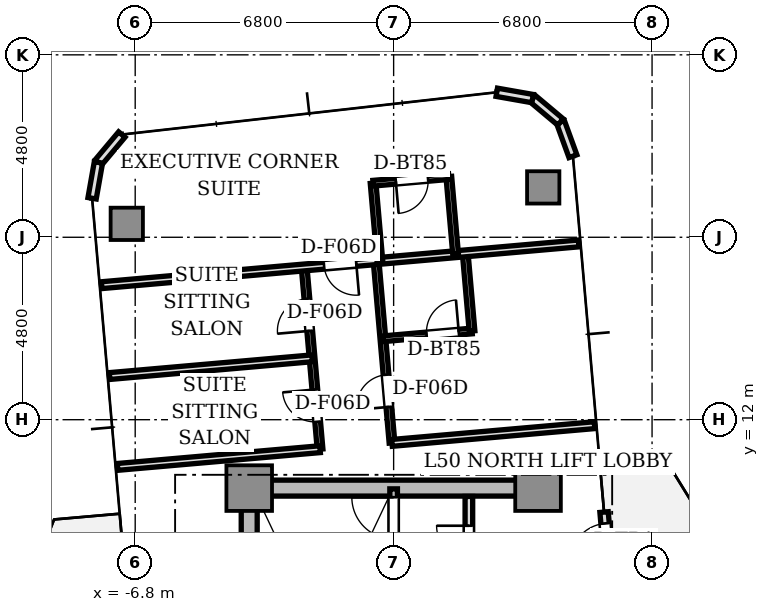
"""IFC4 building model, lengths in metres.
Left out: names, types, materials, properties, quantities, classifications, styles, units other than length and angle.
Written with IfcOpenShell. Run it as: python <this file> out.ifc"""

import sys

from ifc_helpers import new_model, si_unit, direction, frame, frame_2d, origin, origin_2d, place, context, subcontext, project, spatial, rectangle, extrude, source, transform, mapped, element, fill, save


model = new_model("IFC4")
c1 = context("Model", 3, precision=1e-05, world=origin(), true_north=direction((0.0, 1.0)))
c2 = subcontext(c1, "Body", "Model", "MODEL_VIEW")
j1 = project(units=[si_unit("LENGTHUNIT", "METRE"), si_unit("PLANEANGLEUNIT", "RADIAN")], contexts=[c1])
p1 = place(None, origin())
s1 = spatial("IfcSite", under=j1, at=p1, CompositionType="ELEMENT")
p2 = place(p1, origin())
s2 = spatial("IfcBuilding", under=s1, at=p2, CompositionType="ELEMENT")
p3 = place(p2, frame((0.0, 0.0, 181.9)))
s3 = spatial("IfcBuildingStorey", under=s2, at=p3, CompositionType="ELEMENT", Elevation=181.9)
p4 = place(p3, frame((-3.55, 10.2, 0.0), z_axis=(0.0, 0.0, 1.0), x_axis=(1.0, 0.0, 0.0)))
e1 = element("IfcWall", 1, at=p4, inside=s3, PredefinedType="SHEAR", context=c2, shape_type="SweptSolid", body=[
    extrude(rectangle(XDim=7.1, YDim=0.42, at=frame_2d((3.55, 0.0))), origin(), (0.0, 0.0, 1.0), 3.11),
])
p5 = place(p3, frame((-3.8, 2.85, 0.0), z_axis=(0.0, 0.0, 1.0), x_axis=(0.0, 1.0, 0.0)))
e2 = element("IfcWall", 2, at=p5, inside=s3, PredefinedType="SHEAR", context=c2, shape_type="SweptSolid", body=[
    extrude(rectangle(XDim=6.9, YDim=0.42, at=frame_2d((3.45, 0.0))), origin(), (0.0, 0.0, 1.0), 3.11),
])
m1 = source(origin(), c2, "Body", "SweptSolid", [
    extrude(rectangle(XDim=1.2, YDim=1.2, at=origin_2d()), origin(), (0.0, 0.0, 1.0), 3.11),
])
for number, where, z_axis, x_axis in (
    (3, (-3.8, 10.2, 0.0), (0.0, 0.0, 1.0), (1.0, 0.0, 0.0)),
    (4, (3.8, 10.2, 0.0), (0.0, 0.0, 1.0), (1.0, 0.0, 0.0)),
):
    element("IfcColumn", number, at=place(p3, frame(where, z_axis=z_axis, x_axis=x_axis)), inside=s3, PredefinedType="COLUMN", context=c2, shape_type="MappedRepresentation", body=[
        mapped(m1, transform((0.0, 0.0, 0.0), scale=1.0)),
    ])
m2 = source(origin(), c2, "Body", "SweptSolid", [
    extrude(rectangle(XDim=0.85, YDim=0.85, at=origin_2d()), origin(), (0.0, 0.0, 1.0), 3.11),
])
for number, where, z_axis, x_axis in (
    (5, (3.936, 18.112, 0.0), (0.0, 0.0, 1.0), (1.0, 0.0, 0.0)),
    (6, (-7.022, 17.153, 0.0), (0.0, 0.0, 1.0), (1.0, 0.0, 0.0)),
):
    element("IfcColumn", number, at=place(p3, frame(where, z_axis=z_axis, x_axis=x_axis)), inside=s3, PredefinedType="COLUMN", context=c2, shape_type="MappedRepresentation", body=[
        mapped(m2, transform((0.0, 0.0, 0.0), scale=1.0)),
    ])
p6 = place(p3, frame((5.772, 6.879, 0.0), z_axis=(0.0, 0.0, 1.0), x_axis=(-0.087168071984, 0.996193619346, 0.0)))
e7 = element("IfcWall", 7, at=p6, inside=s3, PredefinedType="STANDARD", context=c2, shape_type="SweptSolid", body=[
    extrude(rectangle(XDim=2.7, YDim=0.22, at=frame_2d((1.35, 0.0))), origin(), (0.0, 0.0, 1.0), 3.11),
])
p7 = place(p6, frame((1.4, 0.0, 0.0)))
e8 = element("IfcOpeningElement", 8, at=p7, cuts=e7, PredefinedType="OPENING", context=c2, shape_type="SweptSolid", body=[
    extrude(rectangle(XDim=1.0, YDim=2.2, at=frame_2d((0.5, 1.1))), frame((0.0, 0.12, 0.0), z_axis=(0.0, -1.0, 0.0), x_axis=(1.0, 0.0, 0.0)), (0.0, 0.0, 1.0), 0.24),
])
p8 = place(p3, frame((4.718, 18.933, 0.0), z_axis=(0.0, 0.0, 1.0), x_axis=(-0.34188635151, 0.939741306239, 0.0)))
e9 = element("IfcWall", 9, at=p8, inside=s3, PredefinedType="STANDARD", context=c2, shape_type="SweptSolid", body=[
    extrude(rectangle(XDim=0.958, YDim=0.22, at=frame_2d((0.479, 0.0))), origin(), (0.0, 0.0, 1.0), 3.11),
])
for number, where, z_axis, x_axis in (
    (10, (4.39, 19.833, 0.0), (0.0, 0.0, 1.0), (-0.766, 0.643, 0.0)),
    (11, (3.657, 20.449, 0.0), (0.0, 0.0, 1.0), (-0.985, 0.174, 0.0)),
):
    element("IfcWall", number, at=place(p3, frame(where, z_axis=z_axis, x_axis=x_axis)), inside=s3, PredefinedType="STANDARD", context=c2, shape_type="SweptSolid", body=[
        extrude(rectangle(XDim=0.958, YDim=0.22, at=frame_2d((0.479, 0.0))), origin(), (0.0, 0.0, 1.0), 3.11),
    ])
for number, where, z_axis, x_axis in (
    (12, (-7.152, 19.503, 0.0), (0.0, 0.0, 1.0), (-0.643, -0.766, 0.0)),
    (13, (-7.768, 18.769, 0.0), (0.0, 0.0, 1.0), (-0.174, -0.985, 0.0)),
):
    element("IfcWall", number, at=place(p3, frame(where, z_axis=z_axis, x_axis=x_axis)), inside=s3, PredefinedType="STANDARD", context=c2, shape_type="SweptSolid", body=[
        extrude(rectangle(XDim=0.958, YDim=0.22, at=frame_2d((0.479, 0.0))), origin(), (0.0, 0.0, 1.0), 3.11),
    ])
p9 = place(p3, frame((0.0, 2.5, 0.0), z_axis=(0.0, 0.0, 1.0), x_axis=(0.0, 1.0, 0.0)))
e14 = element("IfcWall", 14, at=p9, inside=s3, PredefinedType="SOLIDWALL", context=c2, shape_type="SweptSolid", body=[
    extrude(rectangle(XDim=7.68, YDim=0.2, at=frame_2d((3.84, 0.0))), origin(), (0.0, 0.0, 1.0), 3.11),
])
p10 = place(p9, frame((6.36, 0.0, 0.0)))
e15 = element("IfcOpeningElement", 15, at=p10, cuts=e14, PredefinedType="OPENING", context=c2, shape_type="SweptSolid", body=[
    extrude(rectangle(XDim=1.1, YDim=2.15, at=frame_2d((0.55, 1.075))), frame((0.0, 0.11, 0.0), z_axis=(0.0, -1.0, 0.0), x_axis=(1.0, 0.0, 0.0)), (0.0, 0.0, 1.0), 0.22),
])
p11 = place(p3, frame((1.98, 5.32, 0.0), z_axis=(0.0, 0.0, 1.0), x_axis=(0.0, 1.0, 0.0)))
e16 = element("IfcWall", 16, at=p11, inside=s3, PredefinedType="SOLIDWALL", context=c2, shape_type="SweptSolid", body=[
    extrude(rectangle(XDim=4.66, YDim=0.2, at=frame_2d((2.33, 0.0))), origin(), (0.0, 0.0, 1.0), 2.66),
])
p12 = place(p11, frame((3.04, 0.0, 0.0)))
e17 = element("IfcOpeningElement", 17, at=p12, cuts=e16, PredefinedType="OPENING", context=c2, shape_type="SweptSolid", body=[
    extrude(rectangle(XDim=0.85, YDim=2.1, at=frame_2d((0.425, 1.05))), frame((0.0, 0.11, 0.0), z_axis=(0.0, -1.0, 0.0), x_axis=(1.0, 0.0, 0.0)), (0.0, 0.0, 1.0), 0.22),
])
p13 = place(p3, frame((-1.936, 11.224, 0.0), z_axis=(0.0, 0.0, 1.0), x_axis=(-0.087182724829, 0.996192337097, 0.0)))
e18 = element("IfcWall", 18, at=p13, inside=s3, PredefinedType="PARTITIONING", context=c2, shape_type="SweptSolid", body=[
    extrude(rectangle(XDim=4.8, YDim=0.15, at=frame_2d((2.4, 0.0))), origin(), (0.0, 0.0, 1.0), 2.66),
])
p14 = place(p13, frame((0.725, 0.0, 0.0)))
e19 = element("IfcOpeningElement", 19, at=p14, cuts=e18, PredefinedType="OPENING", context=c2, shape_type="SweptSolid", body=[
    extrude(rectangle(XDim=0.85, YDim=2.1, at=frame_2d((0.425, 1.05))), frame((0.0, 0.085, 0.0), z_axis=(0.0, -1.0, 0.0), x_axis=(1.0, 0.0, 0.0)), (0.0, 0.0, 1.0), 0.17),
])
p15 = place(p13, frame((3.125, 0.0, 0.0)))
e20 = element("IfcOpeningElement", 20, at=p15, cuts=e18, PredefinedType="OPENING", context=c2, shape_type="SweptSolid", body=[
    extrude(rectangle(XDim=0.85, YDim=2.1, at=frame_2d((0.425, 1.05))), frame((0.0, 0.085, 0.0), z_axis=(0.0, -1.0, 0.0), x_axis=(1.0, 0.0, 0.0)), (0.0, 0.0, 1.0), 0.17),
])
p16 = place(p3, frame((-0.043, 11.39, 0.0), z_axis=(0.0, 0.0, 1.0), x_axis=(-0.087178307383, 0.996192723684, 0.0)))
e21 = element("IfcWall", 21, at=p16, inside=s3, PredefinedType="PARTITIONING", context=c2, shape_type="SweptSolid", body=[
    extrude(rectangle(XDim=4.8, YDim=0.15, at=frame_2d((2.4, 0.0))), origin(), (0.0, 0.0, 1.0), 2.66),
])
p17 = place(p16, frame((0.95, 0.0, 0.0)))
e22 = element("IfcOpeningElement", 22, at=p17, cuts=e21, PredefinedType="OPENING", context=c2, shape_type="SweptSolid", body=[
    extrude(rectangle(XDim=0.85, YDim=2.1, at=frame_2d((0.425, 1.05))), frame((0.0, 0.085, 0.0), z_axis=(0.0, -1.0, 0.0), x_axis=(1.0, 0.0, 0.0)), (0.0, 0.0, 1.0), 0.17),
])
for number, where, z_axis, x_axis in (
    (23, (-1.936, 11.224, 0.0), (0.0, 0.0, 1.0), (-0.996, -0.087, 0.0)),
    (24, (5.287, 11.856, 0.0), (0.0, 0.0, 1.0), (-0.996, -0.087, 0.0)),
    (25, (-2.145, 13.615, 0.0), (0.0, 0.0, 1.0), (-0.996, -0.087, 0.0)),
):
    element("IfcWall", number, at=place(p3, frame(where, z_axis=z_axis, x_axis=x_axis)), inside=s3, PredefinedType="PARTITIONING", context=c2, shape_type="SweptSolid", body=[
        extrude(rectangle(XDim=5.35, YDim=0.18, at=frame_2d((2.675, 0.0))), origin(), (0.0, 0.0, 1.0), 2.66),
    ])
p18 = place(p3, frame((-0.282, 14.129, 0.0), z_axis=(0.0, 0.0, 1.0), x_axis=(0.996197656711, 0.087121918963, 0.0)))
e26 = element("IfcWall", 26, at=p18, inside=s3, PredefinedType="PARTITIONING", context=c2, shape_type="SweptSolid", body=[
    extrude(rectangle(XDim=2.354, YDim=0.15, at=frame_2d((1.177, 0.0))), origin(), (0.0, 0.0, 1.0), 2.66),
])
p19 = place(p18, frame((1.154, 0.0, 0.0)))
e27 = element("IfcOpeningElement", 27, at=p19, cuts=e26, PredefinedType="OPENING", context=c2, shape_type="SweptSolid", body=[
    extrude(rectangle(XDim=0.85, YDim=2.1, at=frame_2d((0.425, 1.05))), frame((0.0, 0.085, 0.0), z_axis=(0.0, -1.0, 0.0), x_axis=(1.0, 0.0, 0.0)), (0.0, 0.0, 1.0), 0.17),
])
p20 = place(p3, frame((2.062, 14.334, 0.0), z_axis=(0.0, 0.0, 1.0), x_axis=(-0.087174336889, 0.99619307114, 0.0)))
e28 = element("IfcWall", 28, at=p20, inside=s3, PredefinedType="PARTITIONING", context=c2, shape_type="SweptSolid", body=[
    extrude(rectangle(XDim=2.05, YDim=0.15, at=frame_2d((1.025, 0.0))), origin(), (0.0, 0.0, 1.0), 2.66),
])
p21 = place(p3, frame((4.868, 16.638, 0.0), z_axis=(0.0, 0.0, 1.0), x_axis=(-0.996194790044, -0.087154691724, 0.0)))
e29 = element("IfcWall", 29, at=p21, inside=s3, PredefinedType="PARTITIONING", context=c2, shape_type="SweptSolid", body=[
    extrude(rectangle(XDim=12.6, YDim=0.18, at=frame_2d((6.3, 0.0))), origin(), (0.0, 0.0, 1.0), 2.66),
])
p22 = place(p21, frame((5.875, 0.0, 0.0)))
e30 = element("IfcOpeningElement", 30, at=p22, cuts=e29, PredefinedType="OPENING", context=c2, shape_type="SweptSolid", body=[
    extrude(rectangle(XDim=0.85, YDim=2.1, at=frame_2d((0.425, 1.05))), frame((0.0, 0.1, 0.0), z_axis=(0.0, -1.0, 0.0), x_axis=(1.0, 0.0, 0.0)), (0.0, 0.0, 1.0), 0.2),
])
p23 = place(p3, frame((-0.362, 16.18, 0.0), z_axis=(0.0, 0.0, 1.0), x_axis=(-0.087174336889, 0.99619307114, 0.0)))
e31 = element("IfcWall", 31, at=p23, inside=s3, PredefinedType="PARTITIONING", context=c2, shape_type="SweptSolid", body=[
    extrude(rectangle(XDim=2.05, YDim=0.15, at=frame_2d((1.025, 0.0))), origin(), (0.0, 0.0, 1.0), 2.66),
])
p24 = place(p3, frame((1.631, 16.354, 0.0), z_axis=(0.0, 0.0, 1.0), x_axis=(-0.087184680235, 0.996192165966, 0.0)))
e32 = element("IfcWall", 32, at=p24, inside=s3, PredefinedType="PARTITIONING", context=c2, shape_type="SweptSolid", body=[
    extrude(rectangle(XDim=2.05, YDim=0.15, at=frame_2d((1.025, 0.0))), origin(), (0.0, 0.0, 1.0), 2.66),
])
p25 = place(p3, frame((1.452, 18.396, 0.0), z_axis=(0.0, 0.0, 1.0), x_axis=(-0.996205236158, -0.087035208109, 0.0)))
e33 = element("IfcWall", 33, at=p25, inside=s3, PredefinedType="PARTITIONING", context=c2, shape_type="SweptSolid", body=[
    extrude(rectangle(XDim=2.0, YDim=0.15, at=frame_2d((1.0, 0.0))), origin(), (0.0, 0.0, 1.0), 2.66),
])
p26 = place(p25, frame((0.55, 0.0, 0.0)))
e34 = element("IfcOpeningElement", 34, at=p26, cuts=e33, PredefinedType="OPENING", context=c2, shape_type="SweptSolid", body=[
    extrude(rectangle(XDim=0.85, YDim=2.1, at=frame_2d((0.425, 1.05))), frame((0.0, 0.085, 0.0), z_axis=(0.0, -1.0, 0.0), x_axis=(1.0, 0.0, 0.0)), (0.0, 0.0, 1.0), 0.17),
])
m3 = source(origin(), c2, "Body", "SweptSolid", [
    extrude(rectangle(XDim=1.0, YDim=0.05, at=origin_2d()), origin(), (0.0, 0.0, 1.0), 2.2),
])
p27 = place(p7, frame((0.5, 0.0, 0.0)))
e35 = element("IfcDoor", 35, at=p27, inside=s3, OperationType="SINGLE_SWING_LEFT", PredefinedType="DOOR", context=c2, shape_type="MappedRepresentation", body=[
    mapped(m3, transform((0.0, 0.0, 0.0), scale=1.0)),
])
fill(e8, e35)
m4 = source(origin(), c2, "Body", "SweptSolid", [
    extrude(rectangle(XDim=1.1, YDim=0.05, at=origin_2d()), origin(), (0.0, 0.0, 1.0), 2.15),
])
p28 = place(p10, frame((0.55, 0.0, 0.0)))
e36 = element("IfcDoor", 36, at=p28, inside=s3, OperationType="SINGLE_SWING_RIGHT", PredefinedType="DOOR", context=c2, shape_type="MappedRepresentation", body=[
    mapped(m4, transform((0.0, 0.0, 0.0), scale=1.0)),
])
fill(e15, e36)
m5 = source(origin(), c2, "Body", "SweptSolid", [
    extrude(rectangle(XDim=0.85, YDim=0.05, at=origin_2d()), origin(), (0.0, 0.0, 1.0), 2.1),
])
p29 = place(p12, frame((0.425, 0.0, 0.0)))
e37 = element("IfcDoor", 37, at=p29, inside=s3, OperationType="SINGLE_SWING_RIGHT", PredefinedType="DOOR", context=c2, shape_type="MappedRepresentation", body=[
    mapped(m5, transform((0.0, 0.0, 0.0), scale=1.0)),
])
fill(e17, e37)
p30 = place(p14, frame((0.425, 0.0, 0.0)))
e38 = element("IfcDoor", 38, at=p30, inside=s3, OperationType="SINGLE_SWING_RIGHT", PredefinedType="DOOR", context=c2, shape_type="MappedRepresentation", body=[
    mapped(m5, transform((0.0, 0.0, 0.0), scale=1.0)),
])
fill(e19, e38)
p31 = place(p15, frame((0.425, 0.0, 0.0)))
e39 = element("IfcDoor", 39, at=p31, inside=s3, OperationType="SINGLE_SWING_LEFT", PredefinedType="DOOR", context=c2, shape_type="MappedRepresentation", body=[
    mapped(m5, transform((0.0, 0.0, 0.0), scale=1.0)),
])
fill(e20, e39)
p32 = place(p19, frame((0.425, 0.0, 0.0)))
e40 = element("IfcDoor", 40, at=p32, inside=s3, OperationType="SINGLE_SWING_RIGHT", PredefinedType="DOOR", context=c2, shape_type="MappedRepresentation", body=[
    mapped(m5, transform((0.0, 0.0, 0.0), scale=1.0)),
])
fill(e27, e40)
p33 = place(p17, frame((0.425, 0.0, 0.0)))
e41 = element("IfcDoor", 41, at=p33, inside=s3, OperationType="SINGLE_SWING_LEFT", PredefinedType="DOOR", context=c2, shape_type="MappedRepresentation", body=[
    mapped(m5, transform((0.0, 0.0, 0.0), scale=1.0)),
])
fill(e22, e41)
p34 = place(p26, frame((0.425, 0.0, 0.0)))
e42 = element("IfcDoor", 42, at=p34, inside=s3, OperationType="SINGLE_SWING_RIGHT", PredefinedType="DOOR", context=c2, shape_type="MappedRepresentation", body=[
    mapped(m5, transform((0.0, 0.0, 0.0), scale=1.0)),
])
fill(e34, e42)
p35 = place(p22, frame((0.425, 0.0, 0.0)))
e43 = element("IfcDoor", 43, at=p35, inside=s3, OperationType="SINGLE_SWING_LEFT", PredefinedType="DOOR", context=c2, shape_type="MappedRepresentation", body=[
    mapped(m5, transform((0.0, 0.0, 0.0), scale=1.0)),
])
fill(e30, e43)
save(model, sys.argv[1])
